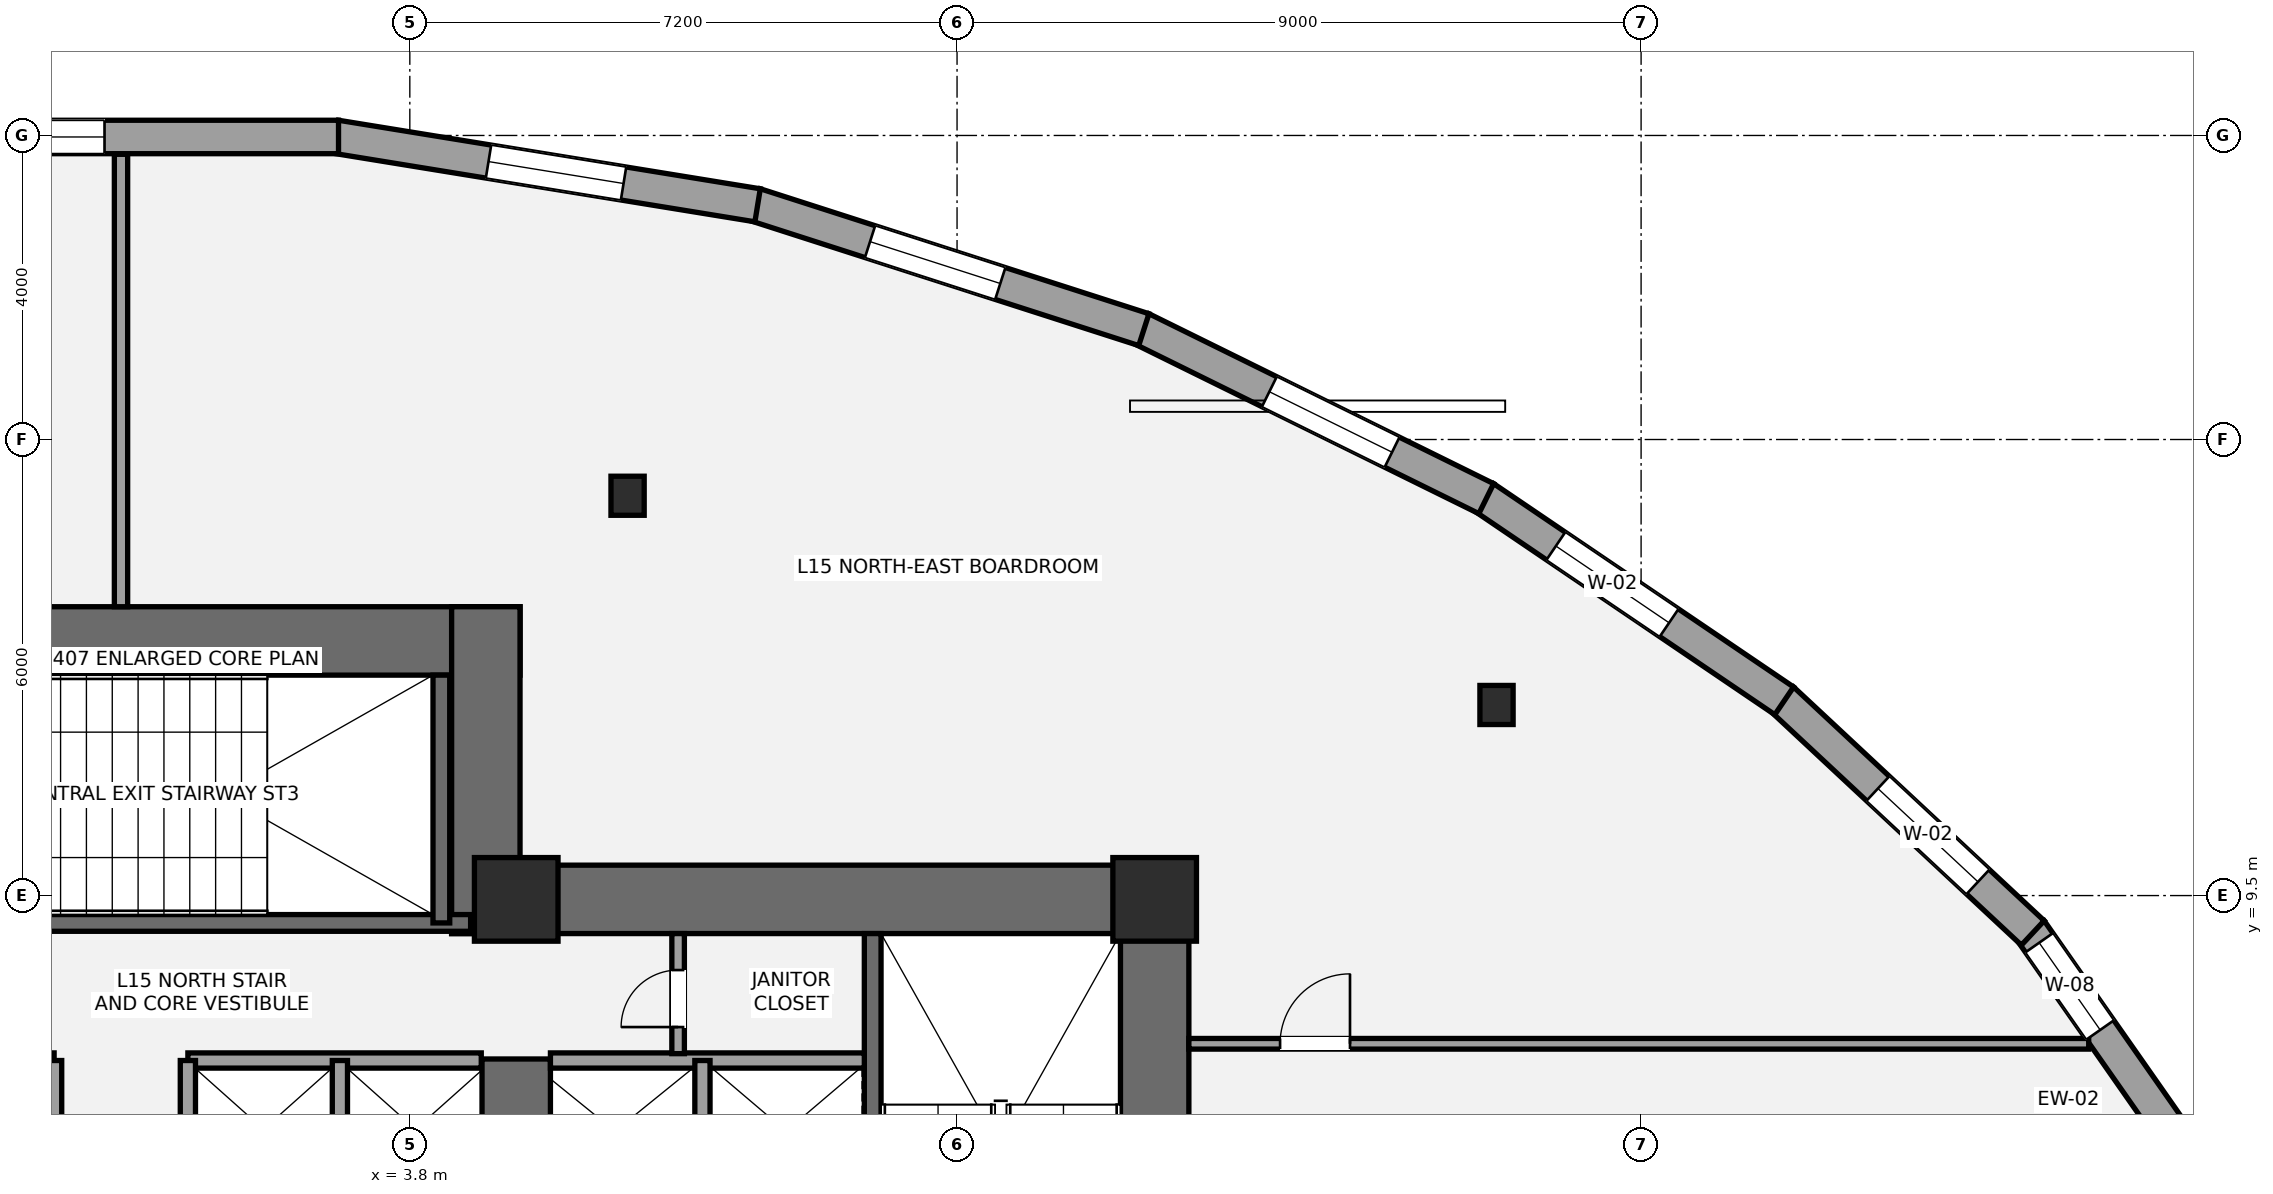
"""IFC4 building model, lengths in metres.
Left out: names, types, materials, properties, quantities, classifications, styles, units other than length and angle.
Written with IfcOpenShell. Run it as: python <this file> out.ifc"""

import sys

from ifc_helpers import new_model, si_unit, direction, frame, frame_2d, origin, origin_2d, place, context, subcontext, project, spatial, rectangle, i_section, extrude, element, fill, save


model = new_model("IFC4")
c1 = context("Model", 3, precision=1e-05, world=origin(), true_north=direction((0.0, 1.0)))
c2 = subcontext(c1, "Body", "Model", "MODEL_VIEW")
j1 = project(units=[si_unit("LENGTHUNIT", "METRE"), si_unit("PLANEANGLEUNIT", "RADIAN")], contexts=[c1])
p1 = place(None, origin())
s1 = spatial("IfcSite", under=j1, at=p1, CompositionType="ELEMENT")
p2 = place(p1, origin())
s2 = spatial("IfcBuilding", under=s1, at=p2, CompositionType="ELEMENT")
p3 = place(p2, frame((0.0, 0.0, 59.4)))
s3 = spatial("IfcBuildingStorey", under=s2, at=p3, CompositionType="ELEMENT", Elevation=59.4)
p4 = place(p3, frame((13.6, 0.95, 0.0), z_axis=(0.0, 0.0, 1.0), x_axis=(0.0, 1.0, 0.0)))
e1 = element("IfcWall", 1, at=p4, inside=s3, PredefinedType="SHEAR", context=c2, shape_type="SweptSolid", body=[
    extrude(rectangle(XDim=8.95, YDim=0.9, at=frame_2d((4.475, 0.0))), origin(), (0.0, 0.0, 1.0), 3.6),
])
p5 = place(p3, frame((4.35, 9.45, 0.0), z_axis=(0.0, 0.0, 1.0), x_axis=(1.0, 0.0, 0.0)))
e2 = element("IfcWall", 2, at=p5, inside=s3, PredefinedType="SHEAR", context=c2, shape_type="SweptSolid", body=[
    extrude(rectangle(XDim=9.7, YDim=0.9, at=frame_2d((4.85, 0.0))), origin(), (0.0, 0.0, 1.0), 3.6),
])
p6 = place(p3, frame((5.2, 5.35, 0.0), z_axis=(0.0, 0.0, 1.0), x_axis=(0.0, 1.0, 0.0)))
e3 = element("IfcWall", 3, at=p6, inside=s3, PredefinedType="SHEAR", context=c2, shape_type="SweptSolid", body=[
    extrude(rectangle(XDim=2.0, YDim=0.9, at=frame_2d((1.0, 0.0))), origin(), (0.0, 0.0, 1.0), 3.6),
])
p7 = place(p3, frame((9.89, 1.85, 0.0), z_axis=(0.0, 0.0, 1.0), x_axis=(0.0, 1.0, 0.0)))
e4 = element("IfcWall", 4, at=p7, inside=s3, PredefinedType="SHEAR", context=c2, shape_type="SweptSolid", body=[
    extrude(rectangle(XDim=7.15, YDim=0.22, at=frame_2d((3.575, 0.0))), origin(), (0.0, 0.0, 1.0), 3.6),
])
p8 = place(p3, frame((-5.25, 12.85, 0.0), z_axis=(0.0, 0.0, 1.0), x_axis=(1.0, 0.0, 0.0)))
e5 = element("IfcWall", 5, at=p8, inside=s3, PredefinedType="SHEAR", context=c2, shape_type="SweptSolid", body=[
    extrude(rectangle(XDim=10.5, YDim=0.9, at=frame_2d((5.25, 0.0))), origin(), (0.0, 0.0, 1.0), 3.6),
])
p9 = place(p3, frame((4.8, 9.0, 0.0), z_axis=(0.0, 0.0, 1.0), x_axis=(0.0, 1.0, 0.0)))
e6 = element("IfcWall", 6, at=p9, inside=s3, PredefinedType="SHEAR", context=c2, shape_type="SweptSolid", body=[
    extrude(rectangle(XDim=4.3, YDim=0.9, at=frame_2d((2.15, 0.0))), origin(), (0.0, 0.0, 1.0), 3.6),
])
p10 = place(p3, frame((-4.7, 9.14, 0.0), z_axis=(0.0, 0.0, 1.0), x_axis=(1.0, 0.0, 0.0)))
e7 = element("IfcWall", 7, at=p10, inside=s3, PredefinedType="SHEAR", context=c2, shape_type="SweptSolid", body=[
    extrude(rectangle(XDim=9.3, YDim=0.22, at=frame_2d((4.65, 0.0))), origin(), (0.0, 0.0, 1.0), 3.6),
])
p11 = place(p10, frame((1.15, 0.0, 0.0)))
e8 = element("IfcOpeningElement", 8, at=p11, cuts=e7, PredefinedType="OPENING", context=c2, shape_type="SweptSolid", body=[
    extrude(rectangle(XDim=1.05, YDim=2.15, at=frame_2d((0.525, 1.075))), frame((0.0, 0.12, 0.0), z_axis=(0.0, -1.0, 0.0), x_axis=(1.0, 0.0, 0.0)), (0.0, 0.0, 1.0), 0.24),
])
p12 = place(p3, frame((4.215, 9.14, 0.0), z_axis=(0.0, 0.0, 1.0), x_axis=(0.0, 1.0, 0.0)))
e9 = element("IfcWall", 9, at=p12, inside=s3, PredefinedType="SHEAR", context=c2, shape_type="SweptSolid", body=[
    extrude(rectangle(XDim=3.26, YDim=0.22, at=frame_2d((1.63, 0.0))), origin(), (0.0, 0.0, 1.0), 3.6),
])
for number, where, z_axis, x_axis in (
    (10, (5.2, 9.45, 0.0), (0.0, 0.0, 1.0), (1.0, 0.0, 0.0)),
    (11, (13.6, 9.45, 0.0), (0.0, 0.0, 1.0), (1.0, 0.0, 0.0)),
):
    element("IfcColumn", number, at=place(p3, frame(where, z_axis=z_axis, x_axis=x_axis)), inside=s3, PredefinedType="COLUMN", context=c2, shape_type="SweptSolid", body=[
        extrude(rectangle(XDim=1.1, YDim=1.1, at=origin_2d()), origin(), (0.0, 0.0, 1.0), 3.6),
    ])
for number, where, z_axis, x_axis in (
    (12, (18.098, 12.007, 0.0), (0.0, 0.0, 1.0), (1.0, 0.0, 0.0)),
    (13, (6.665, 14.76, 0.0), (0.0, 0.0, 1.0), (1.0, 0.0, 0.0)),
):
    element("IfcColumn", number, at=place(p3, frame(where, z_axis=z_axis, x_axis=x_axis)), inside=s3, PredefinedType="COLUMN", context=c2, shape_type="SweptSolid", body=[
        extrude(i_section(OverallWidth=0.437, OverallDepth=0.514, WebThickness=0.061, FlangeThickness=0.097, at=origin_2d()), origin(), (0.0, 0.0, 1.0), 3.6),
    ])
p13 = place(p3, frame((25.123, 9.043, 0.0), z_axis=(0.0, 0.0, 1.0), x_axis=(0.573152463572, -0.819448749771, 0.0)))
e14 = element("IfcWall", 14, at=p13, inside=s3, PredefinedType="STANDARD", context=c2, shape_type="SweptSolid", body=[
    extrude(rectangle(XDim=4.231, YDim=0.44, at=frame_2d((2.115, 0.0))), origin(), (0.0, 0.0, 1.0), 2.529),
])
p14 = place(p13, frame((0.2, 0.0, 0.58)))
e15 = element("IfcOpeningElement", 15, at=p14, cuts=e14, PredefinedType="OPENING", context=c2, shape_type="SweptSolid", body=[
    extrude(rectangle(XDim=1.4, YDim=1.55, at=frame_2d((0.7, 0.775))), frame((0.0, 0.23, 0.0), z_axis=(0.0, -1.0, 0.0), x_axis=(1.0, 0.0, 0.0)), (0.0, 0.0, 1.0), 0.46),
])
p15 = place(p3, frame((21.856, 12.083, 0.0), z_axis=(0.0, 0.0, 1.0), x_axis=(0.731343335822, -0.682009475849, 0.0)))
e16 = element("IfcWall", 16, at=p15, inside=s3, PredefinedType="STANDARD", context=c2, shape_type="SweptSolid", body=[
    extrude(rectangle(XDim=4.508, YDim=0.44, at=frame_2d((2.254, 0.0))), origin(), (0.0, 0.0, 1.0), 2.529),
])
p16 = place(p15, frame((1.722, 0.0, 0.65)))
e17 = element("IfcOpeningElement", 17, at=p16, cuts=e16, PredefinedType="OPENING", context=c2, shape_type="SweptSolid", body=[
    extrude(rectangle(XDim=1.8, YDim=1.7, at=frame_2d((0.9, 0.85))), frame((0.0, 0.23, 0.0), z_axis=(0.0, -1.0, 0.0), x_axis=(1.0, 0.0, 0.0)), (0.0, 0.0, 1.0), 0.46),
])
p17 = place(p3, frame((17.937, 14.737, 0.0), z_axis=(0.0, 0.0, 1.0), x_axis=(0.827723816917, -0.561135708103, 0.0)))
e18 = element("IfcWall", 18, at=p17, inside=s3, PredefinedType="STANDARD", context=c2, shape_type="SweptSolid", body=[
    extrude(rectangle(XDim=4.768, YDim=0.44, at=frame_2d((2.384, 0.0))), origin(), (0.0, 0.0, 1.0), 2.529),
])
p18 = place(p17, frame((1.138, 0.0, 0.65)))
e19 = element("IfcOpeningElement", 19, at=p18, cuts=e18, PredefinedType="OPENING", context=c2, shape_type="SweptSolid", body=[
    extrude(rectangle(XDim=1.8, YDim=1.7, at=frame_2d((0.9, 0.85))), frame((0.0, 0.23, 0.0), z_axis=(0.0, -1.0, 0.0), x_axis=(1.0, 0.0, 0.0)), (0.0, 0.0, 1.0), 0.46),
])
p19 = place(p3, frame((13.428, 16.958, 0.0), z_axis=(0.0, 0.0, 1.0), x_axis=(0.896962161347, -0.442107318545, 0.0)))
e20 = element("IfcWall", 20, at=p19, inside=s3, PredefinedType="STANDARD", context=c2, shape_type="SweptSolid", body=[
    extrude(rectangle(XDim=5.056, YDim=0.44, at=frame_2d((2.528, 0.0))), origin(), (0.0, 0.0, 1.0), 2.529),
])
p20 = place(p19, frame((1.874, 0.0, 0.65)))
e21 = element("IfcOpeningElement", 21, at=p20, cuts=e20, PredefinedType="OPENING", context=c2, shape_type="SweptSolid", body=[
    extrude(rectangle(XDim=1.8, YDim=1.7, at=frame_2d((0.9, 0.85))), frame((0.0, 0.23, 0.0), z_axis=(0.0, -1.0, 0.0), x_axis=(1.0, 0.0, 0.0)), (0.0, 0.0, 1.0), 0.46),
])
p21 = place(p3, frame((8.344, 18.589, 0.0), z_axis=(0.0, 0.0, 1.0), x_axis=(0.95202383213, -0.30602389295, 0.0)))
e22 = element("IfcWall", 22, at=p21, inside=s3, PredefinedType="STANDARD", context=c2, shape_type="SweptSolid", body=[
    extrude(rectangle(XDim=5.372, YDim=0.44, at=frame_2d((2.686, 0.0))), origin(), (0.0, 0.0, 1.0), 2.529),
])
p22 = place(p21, frame((1.587, 0.0, 0.65)))
e23 = element("IfcOpeningElement", 23, at=p22, cuts=e22, PredefinedType="OPENING", context=c2, shape_type="SweptSolid", body=[
    extrude(rectangle(XDim=1.8, YDim=1.7, at=frame_2d((0.9, 0.85))), frame((0.0, 0.23, 0.0), z_axis=(0.0, -1.0, 0.0), x_axis=(1.0, 0.0, 0.0)), (0.0, 0.0, 1.0), 0.46),
])
p23 = place(p3, frame((2.827, 19.483, 0.0), z_axis=(0.0, 0.0, 1.0), x_axis=(0.987057031186, -0.160369626756, 0.0)))
e24 = element("IfcWall", 24, at=p23, inside=s3, PredefinedType="STANDARD", context=c2, shape_type="SweptSolid", body=[
    extrude(rectangle(XDim=5.622, YDim=0.44, at=frame_2d((2.811, 0.0))), origin(), (0.0, 0.0, 1.0), 2.529),
])
p24 = place(p23, frame((2.035, 0.0, 0.65)))
e25 = element("IfcOpeningElement", 25, at=p24, cuts=e24, PredefinedType="OPENING", context=c2, shape_type="SweptSolid", body=[
    extrude(rectangle(XDim=1.8, YDim=1.7, at=frame_2d((0.9, 0.85))), frame((0.0, 0.23, 0.0), z_axis=(0.0, -1.0, 0.0), x_axis=(1.0, 0.0, 0.0)), (0.0, 0.0, 1.0), 0.46),
])
p25 = place(p3, frame((-2.862, 19.48, 0.0), z_axis=(0.0, 0.0, 1.0), x_axis=(1.0, 0.0, 0.0)))
e26 = element("IfcWall", 26, at=p25, inside=s3, PredefinedType="STANDARD", context=c2, shape_type="SweptSolid", body=[
    extrude(rectangle(XDim=5.724, YDim=0.44, at=frame_2d((2.862, 0.0))), origin(), (0.0, 0.0, 1.0), 2.533),
])
p26 = place(p25, frame((0.845, 0.0, 0.65)))
e27 = element("IfcOpeningElement", 27, at=p26, cuts=e26, PredefinedType="OPENING", context=c2, shape_type="SweptSolid", body=[
    extrude(rectangle(XDim=1.8, YDim=1.7, at=frame_2d((0.9, 0.85))), frame((0.0, 0.23, 0.0), z_axis=(0.0, -1.0, 0.0), x_axis=(1.0, 0.0, 0.0)), (0.0, 0.0, 1.0), 0.46),
])
p27 = place(p3, frame((5.65, 7.33, 0.0), z_axis=(0.0, 0.0, 1.0), x_axis=(1.0, 0.0, 0.0)))
e28 = element("IfcWall", 28, at=p27, inside=s3, PredefinedType="SOLIDWALL", context=c2, shape_type="SweptSolid", body=[
    extrude(rectangle(XDim=4.13, YDim=0.2, at=frame_2d((2.065, 0.0))), origin(), (0.0, 0.0, 1.0), 3.4),
])
p28 = place(p3, frame((7.65, 5.47, 0.0), z_axis=(0.0, 0.0, 1.0), x_axis=(0.0, 1.0, 0.0)))
e29 = element("IfcWall", 29, at=p28, inside=s3, PredefinedType="SOLIDWALL", context=c2, shape_type="SweptSolid", body=[
    extrude(rectangle(XDim=1.86, YDim=0.2, at=frame_2d((0.93, 0.0))), origin(), (0.0, 0.0, 1.0), 3.4),
])
for number, where, z_axis, x_axis in (
    (30, (-4.74, 7.33, 0.0), (0.0, 0.0, 1.0), (1.0, 0.0, 0.0)),
    (31, (0.88, 7.33, 0.0), (0.0, 0.0, 1.0), (1.0, 0.0, 0.0)),
):
    element("IfcWall", number, at=place(p3, frame(where, z_axis=z_axis, x_axis=x_axis)), inside=s3, PredefinedType="SOLIDWALL", context=c2, shape_type="SweptSolid", body=[
        extrude(rectangle(XDim=3.86, YDim=0.2, at=frame_2d((1.93, 0.0))), origin(), (0.0, 0.0, 1.0), 3.4),
    ])
for number, where, z_axis, x_axis in (
    (32, (2.88, 5.52, 0.0), (0.0, 0.0, 1.0), (0.0, 1.0, 0.0)),
    (33, (-0.88, 5.52, 0.0), (0.0, 0.0, 1.0), (0.0, 1.0, 0.0)),
    (34, (0.88, 5.52, 0.0), (0.0, 0.0, 1.0), (0.0, 1.0, 0.0)),
):
    element("IfcWall", number, at=place(p3, frame(where, z_axis=z_axis, x_axis=x_axis)), inside=s3, PredefinedType="SOLIDWALL", context=c2, shape_type="SweptSolid", body=[
        extrude(rectangle(XDim=1.81, YDim=0.2, at=frame_2d((0.905, 0.0))), origin(), (0.0, 0.0, 1.0), 3.4),
    ])
p29 = place(p3, frame((7.33, 7.42, 0.0), z_axis=(0.0, 0.0, 1.0), x_axis=(0.0, 1.0, 0.0)))
e35 = element("IfcWall", 35, at=p29, inside=s3, PredefinedType="PARTITIONING", context=c2, shape_type="SweptSolid", body=[
    extrude(rectangle(XDim=1.58, YDim=0.165, at=frame_2d((0.79, 0.0))), origin(), (0.0, 0.0, 1.0), 3.4),
])
p30 = place(p29, frame((0.35, 0.0, 0.0)))
e36 = element("IfcOpeningElement", 36, at=p30, cuts=e35, PredefinedType="OPENING", context=c2, shape_type="SweptSolid", body=[
    extrude(rectangle(XDim=0.75, YDim=2.1, at=frame_2d((0.375, 1.05))), frame((0.0, 0.093, 0.0), z_axis=(0.0, -1.0, 0.0), x_axis=(1.0, 0.0, 0.0)), (0.0, 0.0, 1.0), 0.185),
])
p31 = place(p3, frame((14.05, 7.55, 0.0), z_axis=(0.0, 0.0, 1.0), x_axis=(1.0, 0.0, 0.0)))
e37 = element("IfcWall", 37, at=p31, inside=s3, PredefinedType="PARTITIONING", context=c2, shape_type="SweptSolid", body=[
    extrude(rectangle(XDim=11.839, YDim=0.14, at=frame_2d((5.92, 0.0))), origin(), (0.0, 0.0, 1.0), 2.853),
])
p32 = place(p31, frame((1.2, 0.0, 0.0)))
e38 = element("IfcOpeningElement", 38, at=p32, cuts=e37, PredefinedType="OPENING", context=c2, shape_type="SweptSolid", body=[
    extrude(rectangle(XDim=0.92, YDim=2.15, at=frame_2d((0.46, 1.075))), frame((0.0, 0.08, 0.0), z_axis=(0.0, -1.0, 0.0), x_axis=(1.0, 0.0, 0.0)), (0.0, 0.0, 1.0), 0.16),
])
p33 = place(p3, frame((0.0, 13.3, 0.0), z_axis=(0.0, 0.0, 1.0), x_axis=(0.0, 1.0, 0.0)))
e39 = element("IfcWall", 39, at=p33, inside=s3, PredefinedType="PARTITIONING", context=c2, shape_type="SweptSolid", body=[
    extrude(rectangle(XDim=5.952, YDim=0.175, at=frame_2d((2.976, 0.0))), origin(), (0.0, 0.0, 1.0), 3.4),
])
p34 = place(p14, origin())
e40 = element("IfcWindow", 40, at=p34, inside=s3, PartitioningType="SINGLE_PANEL", PredefinedType="WINDOW", context=c2, shape_type="SweptSolid", body=[
    extrude(rectangle(XDim=1.4, YDim=1.55, at=frame_2d((0.7, 0.775))), frame((0.0, -0.01, 0.0), z_axis=(0.0, -1.0, 0.0), x_axis=(1.0, 0.0, 0.0)), (0.0, 0.0, 1.0), 0.06),
])
fill(e15, e40)
p35 = place(p16, origin())
e41 = element("IfcWindow", 41, at=p35, inside=s3, PartitioningType="SINGLE_PANEL", PredefinedType="WINDOW", context=c2, shape_type="SweptSolid", body=[
    extrude(rectangle(XDim=1.8, YDim=1.7, at=frame_2d((0.9, 0.85))), frame((0.0, -0.01, 0.0), z_axis=(0.0, -1.0, 0.0), x_axis=(1.0, 0.0, 0.0)), (0.0, 0.0, 1.0), 0.06),
])
fill(e17, e41)
p36 = place(p18, origin())
e42 = element("IfcWindow", 42, at=p36, inside=s3, PartitioningType="SINGLE_PANEL", PredefinedType="WINDOW", context=c2, shape_type="SweptSolid", body=[
    extrude(rectangle(XDim=1.8, YDim=1.7, at=frame_2d((0.9, 0.85))), frame((0.0, -0.01, 0.0), z_axis=(0.0, -1.0, 0.0), x_axis=(1.0, 0.0, 0.0)), (0.0, 0.0, 1.0), 0.06),
])
fill(e19, e42)
p37 = place(p20, origin())
e43 = element("IfcWindow", 43, at=p37, inside=s3, PartitioningType="SINGLE_PANEL", PredefinedType="WINDOW", context=c2, shape_type="SweptSolid", body=[
    extrude(rectangle(XDim=1.8, YDim=1.7, at=frame_2d((0.9, 0.85))), frame((0.0, -0.01, 0.0), z_axis=(0.0, -1.0, 0.0), x_axis=(1.0, 0.0, 0.0)), (0.0, 0.0, 1.0), 0.06),
])
fill(e21, e43)
p38 = place(p22, origin())
e44 = element("IfcWindow", 44, at=p38, inside=s3, PartitioningType="SINGLE_PANEL", PredefinedType="WINDOW", context=c2, shape_type="SweptSolid", body=[
    extrude(rectangle(XDim=1.8, YDim=1.7, at=frame_2d((0.9, 0.85))), frame((0.0, -0.01, 0.0), z_axis=(0.0, -1.0, 0.0), x_axis=(1.0, 0.0, 0.0)), (0.0, 0.0, 1.0), 0.06),
])
fill(e23, e44)
p39 = place(p24, origin())
e45 = element("IfcWindow", 45, at=p39, inside=s3, PartitioningType="SINGLE_PANEL", PredefinedType="WINDOW", context=c2, shape_type="SweptSolid", body=[
    extrude(rectangle(XDim=1.8, YDim=1.7, at=frame_2d((0.9, 0.85))), frame((0.0, -0.01, 0.0), z_axis=(0.0, -1.0, 0.0), x_axis=(1.0, 0.0, 0.0)), (0.0, 0.0, 1.0), 0.06),
])
fill(e25, e45)
p40 = place(p26, origin())
e46 = element("IfcWindow", 46, at=p40, inside=s3, PartitioningType="SINGLE_PANEL", PredefinedType="WINDOW", context=c2, shape_type="SweptSolid", body=[
    extrude(rectangle(XDim=1.8, YDim=1.7, at=frame_2d((0.9, 0.85))), frame((0.0, -0.01, 0.0), z_axis=(0.0, -1.0, 0.0), x_axis=(1.0, 0.0, 0.0)), (0.0, 0.0, 1.0), 0.06),
])
fill(e27, e46)
p41 = place(p30, origin())
e47 = element("IfcDoor", 47, at=p41, inside=s3, OperationType="SINGLE_SWING_LEFT", PredefinedType="DOOR", context=c2, shape_type="SweptSolid", body=[
    extrude(rectangle(XDim=0.75, YDim=2.1, at=frame_2d((0.375, 1.05))), frame((0.0, 0.025, 0.0), z_axis=(0.0, -1.0, 0.0), x_axis=(1.0, 0.0, 0.0)), (0.0, 0.0, 1.0), 0.05),
])
fill(e36, e47)
p42 = place(p32, origin())
e48 = element("IfcDoor", 48, at=p42, inside=s3, OperationType="SINGLE_SWING_RIGHT", PredefinedType="DOOR", context=c2, shape_type="SweptSolid", body=[
    extrude(rectangle(XDim=0.92, YDim=2.15, at=frame_2d((0.46, 1.075))), frame((0.0, 0.025, 0.0), z_axis=(0.0, -1.0, 0.0), x_axis=(1.0, 0.0, 0.0)), (0.0, 0.0, 1.0), 0.05),
])
fill(e38, e48)
save(model, sys.argv[1])
